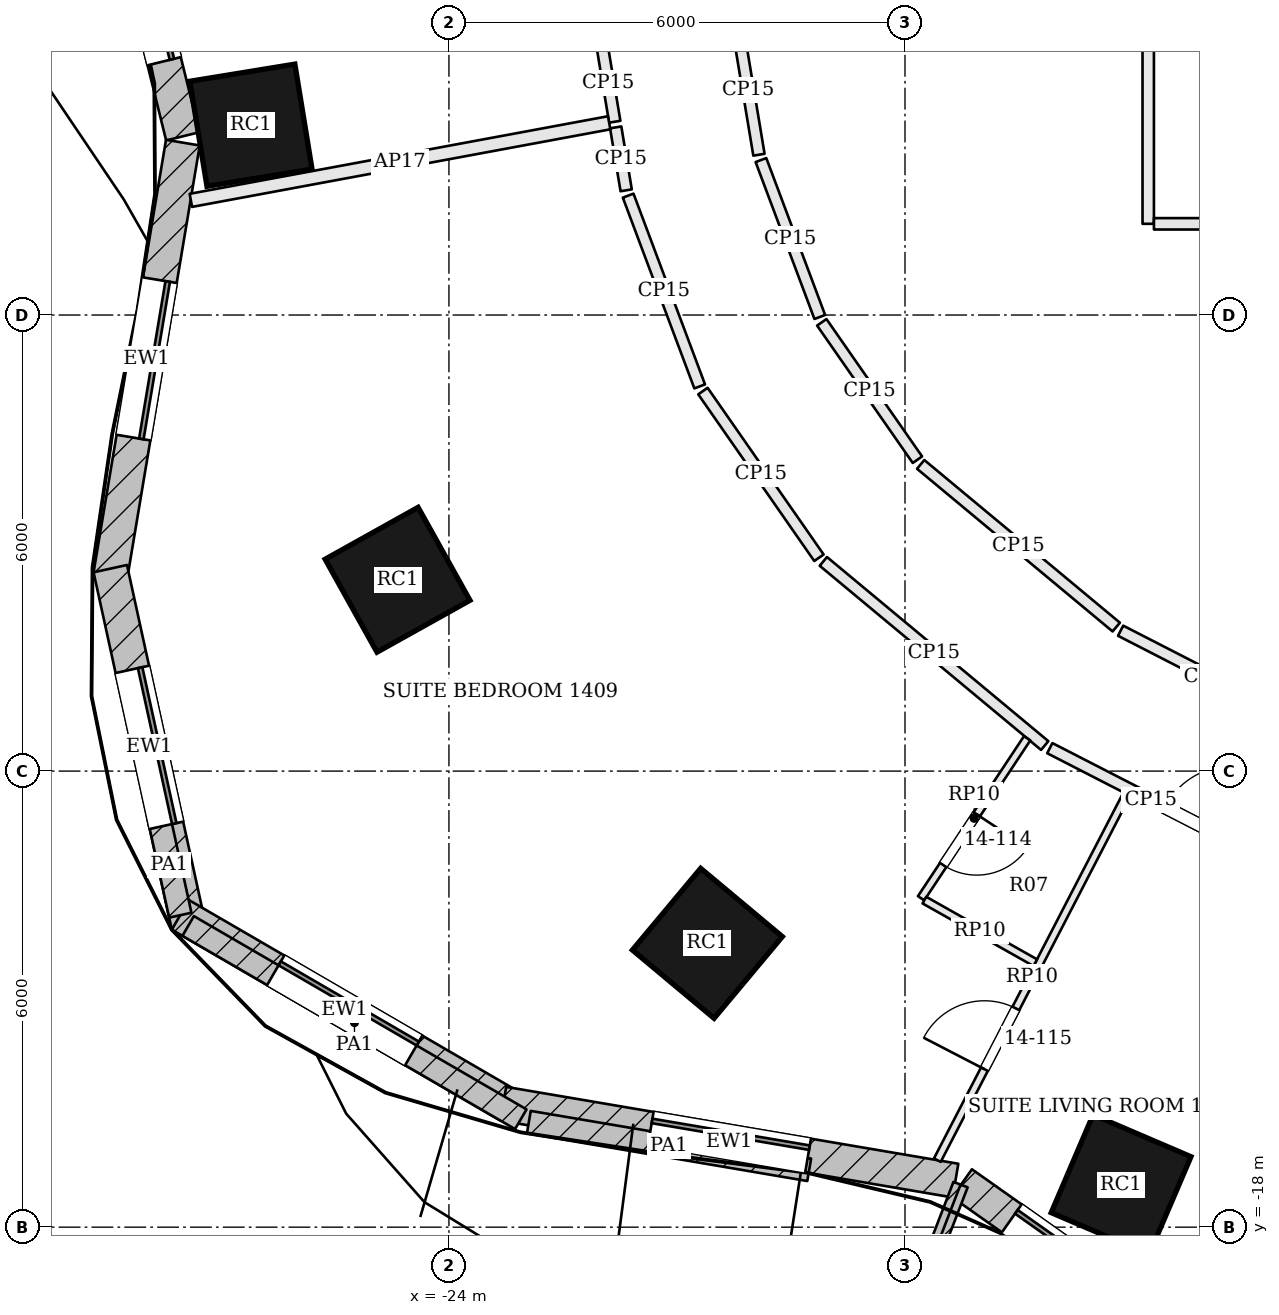
"""IFC4 building model, lengths in metres.
Left out: names, types, materials, properties, quantities, classifications, styles, units other than length and angle.
Written with IfcOpenShell. Run it as: python <this file> out.ifc"""

import sys

from ifc_helpers import new_model, si_unit, direction, frame, frame_2d, origin, origin_2d, place, context, subcontext, project, spatial, rectangle, extrude, element, fill, save


model = new_model("IFC4")
c1 = context("Model", 3, precision=1e-05, world=origin(), true_north=direction((0.0, 1.0)))
c2 = subcontext(c1, "Body", "Model", "MODEL_VIEW")
j1 = project(units=[si_unit("LENGTHUNIT", "METRE"), si_unit("PLANEANGLEUNIT", "RADIAN")], contexts=[c1])
p1 = place(None, origin())
s1 = spatial("IfcSite", under=j1, at=p1, CompositionType="ELEMENT")
p2 = place(p1, origin())
s2 = spatial("IfcBuilding", under=s1, at=p2, CompositionType="ELEMENT")
p3 = place(p2, frame((0.0, 0.0, 66.3)))
s3 = spatial("IfcBuildingStorey", under=s2, at=p3, CompositionType="ELEMENT", Elevation=66.3)
for number, where, z_axis, x_axis in (
    (1, (-26.605, -3.503, 0.0), (0.0, 0.0, 1.0), (0.161, -0.987, 0.0)),
    (2, (-24.676, -9.483, 0.0), (0.0, 0.0, 1.0), (0.487, -0.873, 0.0)),
    (3, (-20.6, -14.266, 0.0), (0.0, 0.0, 1.0), (0.767, -0.641, 0.0)),
    (4, (-15.157, -17.441, 0.0), (0.0, 0.0, 1.0), (0.919, -0.394, 0.0)),
):
    element("IfcColumn", number, at=place(p3, frame(where, z_axis=z_axis, x_axis=x_axis)), inside=s3, PredefinedType="COLUMN", context=c2, shape_type="SweptSolid", body=[
        extrude(rectangle(XDim=1.4, YDim=1.4, at=origin_2d()), origin(), (0.0, 0.0, 1.0), 3.6),
    ])
p4 = place(p3, frame((-28.422, 0.075, 0.0), z_axis=(0.0, 0.0, 1.0), x_axis=(0.239809222807, -0.970820033094, 0.0)))
e5 = element("IfcWall", 5, at=p4, inside=s3, PredefinedType="SOLIDWALL", context=c2, shape_type="SweptSolid", body=[
    extrude(rectangle(XDim=3.836, YDim=0.45, at=frame_2d((1.918, 0.0))), origin(), (0.0, 0.0, 1.0), 3.4),
])
p5 = place(p4, frame((1.018, 0.0, 0.9)))
e6 = element("IfcOpeningElement", 6, at=p5, cuts=e5, PredefinedType="OPENING", context=c2, shape_type="SweptSolid", body=[
    extrude(rectangle(XDim=1.8, YDim=2.0, at=frame_2d((0.9, 1.0))), frame((0.0, 0.235, 0.0), z_axis=(0.0, -1.0, 0.0), x_axis=(1.0, 0.0, 0.0)), (0.0, 0.0, 1.0), 0.47),
])
p6 = place(p3, frame((-27.5, -3.732, 0.0), z_axis=(0.0, 0.0, 1.0), x_axis=(-0.165174419367, -0.986264371853, 0.0)))
e7 = element("IfcWall", 7, at=p6, inside=s3, PredefinedType="SOLIDWALL", context=c2, shape_type="SweptSolid", body=[
    extrude(rectangle(XDim=5.769, YDim=0.45, at=frame_2d((2.885, 0.0))), origin(), (0.0, 0.0, 1.0), 3.4),
])
p7 = place(p6, frame((1.834, 0.0, 0.9)))
e8 = element("IfcOpeningElement", 8, at=p7, cuts=e7, PredefinedType="OPENING", context=c2, shape_type="SweptSolid", body=[
    extrude(rectangle(XDim=2.1, YDim=2.0, at=frame_2d((1.05, 1.0))), frame((0.0, 0.235, 0.0), z_axis=(0.0, -1.0, 0.0), x_axis=(1.0, 0.0, 0.0)), (0.0, 0.0, 1.0), 0.47),
])
p8 = place(p3, frame((-28.456, -9.337, 0.0), z_axis=(0.0, 0.0, 1.0), x_axis=(0.213878425795, -0.976860286315, 0.0)))
e9 = element("IfcWall", 9, at=p8, inside=s3, PredefinedType="SOLIDWALL", context=c2, shape_type="SweptSolid", body=[
    extrude(rectangle(XDim=4.812, YDim=0.45, at=frame_2d((2.406, 0.0))), origin(), (0.0, 0.0, 1.0), 3.4),
])
p9 = place(p8, frame((1.356, 0.0, 0.9)))
e10 = element("IfcOpeningElement", 10, at=p9, cuts=e9, PredefinedType="OPENING", context=c2, shape_type="SweptSolid", body=[
    extrude(rectangle(XDim=2.1, YDim=2.0, at=frame_2d((1.05, 1.0))), frame((0.0, 0.235, 0.0), z_axis=(0.0, -1.0, 0.0), x_axis=(1.0, 0.0, 0.0)), (0.0, 0.0, 1.0), 0.47),
])
p10 = place(p3, frame((-27.533, -13.891, 0.0), z_axis=(0.0, 0.0, 1.0), x_axis=(0.864657614938, -0.502361631625, 0.0)))
e11 = element("IfcWall", 11, at=p10, inside=s3, PredefinedType="SOLIDWALL", context=c2, shape_type="SweptSolid", body=[
    extrude(rectangle(XDim=5.001, YDim=0.45, at=frame_2d((2.5, 0.0))), origin(), (0.0, 0.0, 1.0), 3.4),
])
p11 = place(p10, frame((1.45, 0.0, 0.9)))
e12 = element("IfcOpeningElement", 12, at=p11, cuts=e11, PredefinedType="OPENING", context=c2, shape_type="SweptSolid", body=[
    extrude(rectangle(XDim=2.1, YDim=2.0, at=frame_2d((1.05, 1.0))), frame((0.0, 0.235, 0.0), z_axis=(0.0, -1.0, 0.0), x_axis=(1.0, 0.0, 0.0)), (0.0, 0.0, 1.0), 0.47),
])
p12 = place(p3, frame((-23.284, -16.376, 0.0), z_axis=(0.0, 0.0, 1.0), x_axis=(0.985861729428, -0.167560885797, 0.0)))
e13 = element("IfcWall", 13, at=p12, inside=s3, PredefinedType="SOLIDWALL", context=c2, shape_type="SweptSolid", body=[
    extrude(rectangle(XDim=6.033, YDim=0.45, at=frame_2d((3.017, 0.0))), origin(), (0.0, 0.0, 1.0), 3.4),
])
p13 = place(p12, frame((1.967, 0.0, 0.9)))
e14 = element("IfcOpeningElement", 14, at=p13, cuts=e13, PredefinedType="OPENING", context=c2, shape_type="SweptSolid", body=[
    extrude(rectangle(XDim=2.1, YDim=2.0, at=frame_2d((1.05, 1.0))), frame((0.0, 0.235, 0.0), z_axis=(0.0, -1.0, 0.0), x_axis=(1.0, 0.0, 0.0)), (0.0, 0.0, 1.0), 0.47),
])
p14 = place(p3, frame((-17.249, -17.422, 0.0), z_axis=(0.0, 0.0, 1.0), x_axis=(0.816589291225, -0.577219134694, 0.0)))
e15 = element("IfcWall", 15, at=p14, inside=s3, PredefinedType="SOLIDWALL", context=c2, shape_type="SweptSolid", body=[
    extrude(rectangle(XDim=3.701, YDim=0.45, at=frame_2d((1.851, 0.0))), origin(), (0.0, 0.0, 1.0), 3.4),
])
p15 = place(p14, frame((0.801, 0.0, 0.9)))
e16 = element("IfcOpeningElement", 16, at=p15, cuts=e15, PredefinedType="OPENING", context=c2, shape_type="SweptSolid", body=[
    extrude(rectangle(XDim=2.1, YDim=2.0, at=frame_2d((1.05, 1.0))), frame((0.0, 0.235, 0.0), z_axis=(0.0, -1.0, 0.0), x_axis=(1.0, 0.0, 0.0)), (0.0, 0.0, 1.0), 0.47),
])
p16 = place(p3, frame((-17.269, -17.44, 0.0), z_axis=(0.0, 0.0, 1.0), x_axis=(-0.359381039836, -0.933190906624, 0.0)))
e17 = element("IfcWall", 17, at=p16, inside=s3, PredefinedType="SOLIDWALL", context=c2, shape_type="SweptSolid", body=[
    extrude(rectangle(XDim=1.75, YDim=0.2, at=frame_2d((0.875, 0.0))), origin(), (0.0, 0.0, 1.0), 3.4),
])
p17 = place(p3, frame((-27.823, -12.577, 3.6), z_axis=(0.0, 0.0, 1.0), x_axis=(0.213826357694, -0.976871684898, 0.0)))
e18 = element("IfcWall", 18, at=p17, inside=s3, PredefinedType="PARAPET", context=c2, shape_type="SweptSolid", body=[
    extrude(rectangle(XDim=1.35, YDim=0.3, at=frame_2d((0.675, 0.0))), origin(), (0.0, 0.0, 1.0), 1.1),
])
p18 = place(p3, frame((-27.431, -14.038, 3.6), z_axis=(0.0, 0.0, 1.0), x_axis=(0.864664590165, -0.502349625773, 0.0)))
e19 = element("IfcWall", 19, at=p18, inside=s3, PredefinedType="PARAPET", context=c2, shape_type="SweptSolid", body=[
    extrude(rectangle(XDim=5.061, YDim=0.3, at=frame_2d((2.531, 0.0))), origin(), (0.0, 0.0, 1.0), 1.1),
])
p19 = place(p3, frame((-22.949, -16.618, 3.6), z_axis=(0.0, 0.0, 1.0), x_axis=(0.985859727788, -0.167572662229, 0.0)))
e20 = element("IfcWall", 20, at=p19, inside=s3, PredefinedType="PARAPET", context=c2, shape_type="SweptSolid", body=[
    extrude(rectangle(XDim=3.741, YDim=0.3, at=frame_2d((1.871, 0.0))), origin(), (0.0, 0.0, 1.0), 1.1),
])
p20 = place(p3, frame((-21.989, -2.43, 0.0), z_axis=(0.0, 0.0, 1.0), x_axis=(0.164170791844, -0.986431929281, 0.0)))
e21 = element("IfcWall", 21, at=p20, inside=s3, PredefinedType="PARTITIONING", context=c2, shape_type="SweptSolid", body=[
    extrude(rectangle(XDim=1.041, YDim=0.15, at=frame_2d((0.521, 0.0))), origin(), (0.0, 0.0, 1.0), 2.68),
])
p21 = place(p3, frame((-27.396, -4.491, 0.0), z_axis=(0.0, 0.0, 1.0), x_axis=(0.983238590395, 0.182323543069, 0.0)))
e22 = element("IfcWall", 22, at=p21, inside=s3, PredefinedType="PARTITIONING", context=c2, shape_type="SweptSolid", body=[
    extrude(rectangle(XDim=5.597, YDim=0.175, at=frame_2d((2.799, 0.0))), origin(), (0.0, 0.0, 1.0), 2.68),
])
p22 = place(p3, frame((-21.806, -3.531, 0.0), z_axis=(0.0, 0.0, 1.0), x_axis=(0.164068764938, -0.986448904086, 0.0)))
e23 = element("IfcWall", 23, at=p22, inside=s3, PredefinedType="PARTITIONING", context=c2, shape_type="SweptSolid", body=[
    extrude(rectangle(XDim=0.839, YDim=0.15, at=frame_2d((0.42, 0.0))), origin(), (0.0, 0.0, 1.0), 2.68),
])
p23 = place(p3, frame((-21.642, -4.429, 0.0), z_axis=(0.0, 0.0, 1.0), x_axis=(0.350963719781, -0.936389057709, 0.0)))
e24 = element("IfcWall", 24, at=p23, inside=s3, PredefinedType="PARTITIONING", context=c2, shape_type="SweptSolid", body=[
    extrude(rectangle(XDim=2.68, YDim=0.15, at=frame_2d((1.34, 0.0))), origin(), (0.0, 0.0, 1.0), 2.68),
])
p24 = place(p3, frame((-20.658, -7.0, 0.0), z_axis=(0.0, 0.0, 1.0), x_axis=(0.571227800085, -0.820791569407, 0.0)))
e25 = element("IfcWall", 25, at=p24, inside=s3, PredefinedType="PARTITIONING", context=c2, shape_type="SweptSolid", body=[
    extrude(rectangle(XDim=2.672, YDim=0.15, at=frame_2d((1.336, 0.0))), origin(), (0.0, 0.0, 1.0), 2.68),
])
p25 = place(p3, frame((-19.074, -9.241, 0.0), z_axis=(0.0, 0.0, 1.0), x_axis=(0.768812565259, -0.639474189863, 0.0)))
e26 = element("IfcWall", 26, at=p25, inside=s3, PredefinedType="PARTITIONING", context=c2, shape_type="SweptSolid", body=[
    extrude(rectangle(XDim=3.788, YDim=0.15, at=frame_2d((1.894, 0.0))), origin(), (0.0, 0.0, 1.0), 2.68),
])
p26 = place(p3, frame((-16.095, -11.698, 0.0), z_axis=(0.0, 0.0, 1.0), x_axis=(0.88955984693, -0.456818649717, 0.0)))
e27 = element("IfcWall", 27, at=p26, inside=s3, PredefinedType="PARTITIONING", context=c2, shape_type="SweptSolid", body=[
    extrude(rectangle(XDim=2.991, YDim=0.15, at=frame_2d((1.496, 0.0))), origin(), (0.0, 0.0, 1.0), 2.68),
])
p27 = place(p26, frame((1.7, 0.0, 0.0)))
e28 = element("IfcOpeningElement", 28, at=p27, cuts=e27, PredefinedType="OPENING", context=c2, shape_type="SweptSolid", body=[
    extrude(rectangle(XDim=1.0, YDim=2.1, at=frame_2d((0.5, 1.05))), frame((0.0, 0.085, 0.0), z_axis=(0.0, -1.0, 0.0), x_axis=(1.0, 0.0, 0.0)), (0.0, 0.0, 1.0), 0.17),
])
p28 = place(p3, frame((-19.921, -3.891, 0.0), z_axis=(0.0, 0.0, 1.0), x_axis=(-0.164100753818, 0.986443583078, 0.0)))
e29 = element("IfcWall", 29, at=p28, inside=s3, PredefinedType="PARTITIONING", context=c2, shape_type="SweptSolid", body=[
    extrude(rectangle(XDim=1.726, YDim=0.15, at=frame_2d((0.863, 0.0))), origin(), (0.0, 0.0, 1.0), 2.68),
])
p29 = place(p3, frame((-14.8, 10.208, 0.0), z_axis=(0.0, 0.0, 1.0), x_axis=(0.0, -1.0, 0.0)))
e30 = element("IfcWall", 30, at=p29, inside=s3, PredefinedType="PARTITIONING", context=c2, shape_type="SweptSolid", body=[
    extrude(rectangle(XDim=15.008, YDim=0.15, at=frame_2d((7.504, 0.0))), origin(), (0.0, 0.0, 1.0), 2.68),
])
p30 = place(p29, frame((4.567, 0.0, 0.0)))
e31 = element("IfcOpeningElement", 31, at=p30, cuts=e30, PredefinedType="OPENING", context=c2, shape_type="SweptSolid", body=[
    extrude(rectangle(XDim=1.0, YDim=2.1, at=frame_2d((0.5, 1.05))), frame((0.0, 0.085, 0.0), z_axis=(0.0, -1.0, 0.0), x_axis=(1.0, 0.0, 0.0)), (0.0, 0.0, 1.0), 0.17),
])
p31 = place(p3, frame((-14.725, -4.8, 0.0), z_axis=(0.0, 0.0, 1.0), x_axis=(1.0, 0.0, 0.0)))
e32 = element("IfcWall", 32, at=p31, inside=s3, PredefinedType="PARTITIONING", context=c2, shape_type="SweptSolid", body=[
    extrude(rectangle(XDim=29.525, YDim=0.15, at=frame_2d((14.763, 0.0))), origin(), (0.0, 0.0, 1.0), 2.68),
])
p32 = place(p31, frame((3.425, 0.0, 0.0)))
e33 = element("IfcOpeningElement", 33, at=p32, cuts=e32, PredefinedType="OPENING", context=c2, shape_type="SweptSolid", body=[
    extrude(rectangle(XDim=1.8, YDim=2.1, at=frame_2d((0.9, 1.05))), frame((0.0, 0.085, 0.0), z_axis=(0.0, -1.0, 0.0), x_axis=(1.0, 0.0, 0.0)), (0.0, 0.0, 1.0), 0.17),
])
p33 = place(p31, frame((13.825, 0.0, 0.0)))
e34 = element("IfcOpeningElement", 34, at=p33, cuts=e32, PredefinedType="OPENING", context=c2, shape_type="SweptSolid", body=[
    extrude(rectangle(XDim=1.8, YDim=2.1, at=frame_2d((0.9, 1.05))), frame((0.0, 0.085, 0.0), z_axis=(0.0, -1.0, 0.0), x_axis=(1.0, 0.0, 0.0)), (0.0, 0.0, 1.0), 0.17),
])
p34 = place(p31, frame((24.225, 0.0, 0.0)))
e35 = element("IfcOpeningElement", 35, at=p34, cuts=e32, PredefinedType="OPENING", context=c2, shape_type="SweptSolid", body=[
    extrude(rectangle(XDim=1.8, YDim=2.1, at=frame_2d((0.9, 1.05))), frame((0.0, 0.085, 0.0), z_axis=(0.0, -1.0, 0.0), x_axis=(1.0, 0.0, 0.0)), (0.0, 0.0, 1.0), 0.17),
])
p35 = place(p3, frame((-12.815, -11.359, 0.0), z_axis=(0.0, 0.0, 1.0), x_axis=(-0.889622877315, 0.456695890236, 0.0)))
e36 = element("IfcWall", 36, at=p35, inside=s3, PredefinedType="PARTITIONING", context=c2, shape_type="SweptSolid", body=[
    extrude(rectangle(XDim=2.64, YDim=0.15, at=frame_2d((1.32, 0.0))), origin(), (0.0, 0.0, 1.0), 2.68),
])
p36 = place(p3, frame((-15.221, -10.105, 0.0), z_axis=(0.0, 0.0, 1.0), x_axis=(-0.768812916989, 0.639473766992, 0.0)))
e37 = element("IfcWall", 37, at=p36, inside=s3, PredefinedType="PARTITIONING", context=c2, shape_type="SweptSolid", body=[
    extrude(rectangle(XDim=3.347, YDim=0.15, at=frame_2d((1.673, 0.0))), origin(), (0.0, 0.0, 1.0), 2.68),
])
p37 = place(p3, frame((-17.836, -7.904, 0.0), z_axis=(0.0, 0.0, 1.0), x_axis=(-0.571317790711, 0.820728933338, 0.0)))
e38 = element("IfcWall", 38, at=p37, inside=s3, PredefinedType="PARTITIONING", context=c2, shape_type="SweptSolid", body=[
    extrude(rectangle(XDim=2.202, YDim=0.15, at=frame_2d((1.101, 0.0))), origin(), (0.0, 0.0, 1.0), 2.68),
])
p38 = place(p3, frame((-19.121, -6.026, 0.0), z_axis=(0.0, 0.0, 1.0), x_axis=(-0.351026357955, 0.936365578191, 0.0)))
e39 = element("IfcWall", 39, at=p38, inside=s3, PredefinedType="PARTITIONING", context=c2, shape_type="SweptSolid", body=[
    extrude(rectangle(XDim=2.205, YDim=0.15, at=frame_2d((1.103, 0.0))), origin(), (0.0, 0.0, 1.0), 2.68),
])
p39 = place(p3, frame((-17.575, -17.118, 0.0), z_axis=(0.0, 0.0, 1.0), x_axis=(0.459775633783, 0.888035115623, 0.0)))
e40 = element("IfcWall", 40, at=p39, inside=s3, PredefinedType="PARTITIONING", context=c2, shape_type="SweptSolid", body=[
    extrude(rectangle(XDim=5.423, YDim=0.1, at=frame_2d((2.711, 0.0))), origin(), (0.0, 0.0, 1.0), 2.68),
])
p40 = place(p39, frame((1.348, 0.0, 0.0)))
e41 = element("IfcOpeningElement", 41, at=p40, cuts=e40, PredefinedType="OPENING", context=c2, shape_type="SweptSolid", body=[
    extrude(rectangle(XDim=0.9, YDim=2.4, at=frame_2d((0.45, 1.2))), frame((0.0, 0.06, 0.0), z_axis=(0.0, -1.0, 0.0), x_axis=(1.0, 0.0, 0.0)), (0.0, 0.0, 1.0), 0.12),
])
p41 = place(p3, frame((-16.393, -11.568, 0.0), z_axis=(0.0, 0.0, 1.0), x_axis=(-0.552534144139, -0.833490263627, 0.0)))
e42 = element("IfcWall", 42, at=p41, inside=s3, PredefinedType="PARTITIONING", context=c2, shape_type="SweptSolid", body=[
    extrude(rectangle(XDim=2.525, YDim=0.1, at=frame_2d((1.263, 0.0))), origin(), (0.0, 0.0, 1.0), 2.68),
])
p42 = place(p41, frame((1.2, 0.0, 0.0)))
e43 = element("IfcOpeningElement", 43, at=p42, cuts=e42, PredefinedType="OPENING", context=c2, shape_type="SweptSolid", body=[
    extrude(rectangle(XDim=0.8, YDim=2.1, at=frame_2d((0.4, 1.05))), frame((0.0, 0.06, 0.0), z_axis=(0.0, -1.0, 0.0), x_axis=(1.0, 0.0, 0.0)), (0.0, 0.0, 1.0), 0.12),
])
p43 = place(p3, frame((-17.745, -13.698, 0.0), z_axis=(0.0, 0.0, 1.0), x_axis=(0.870948077087, -0.491375057383, 0.0)))
e44 = element("IfcWall", 44, at=p43, inside=s3, PredefinedType="PARTITIONING", context=c2, shape_type="SweptSolid", body=[
    extrude(rectangle(XDim=1.675, YDim=0.1, at=frame_2d((0.837, 0.0))), origin(), (0.0, 0.0, 1.0), 2.68),
])
p44 = place(p5, origin())
e45 = element("IfcWindow", 45, at=p44, inside=s3, PartitioningType="SINGLE_PANEL", PredefinedType="WINDOW", context=c2, shape_type="SweptSolid", body=[
    extrude(rectangle(XDim=1.8, YDim=2.0, at=frame_2d((0.9, 1.0))), frame((0.0, 0.135, 0.0), z_axis=(0.0, -1.0, 0.0), x_axis=(1.0, 0.0, 0.0)), (0.0, 0.0, 1.0), 0.06),
])
fill(e6, e45)
p45 = place(p7, origin())
e46 = element("IfcWindow", 46, at=p45, inside=s3, PartitioningType="SINGLE_PANEL", PredefinedType="WINDOW", context=c2, shape_type="SweptSolid", body=[
    extrude(rectangle(XDim=2.1, YDim=2.0, at=frame_2d((1.05, 1.0))), frame((0.0, 0.135, 0.0), z_axis=(0.0, -1.0, 0.0), x_axis=(1.0, 0.0, 0.0)), (0.0, 0.0, 1.0), 0.06),
])
fill(e8, e46)
p46 = place(p9, origin())
e47 = element("IfcWindow", 47, at=p46, inside=s3, PartitioningType="SINGLE_PANEL", PredefinedType="WINDOW", context=c2, shape_type="SweptSolid", body=[
    extrude(rectangle(XDim=2.1, YDim=2.0, at=frame_2d((1.05, 1.0))), frame((0.0, 0.135, 0.0), z_axis=(0.0, -1.0, 0.0), x_axis=(1.0, 0.0, 0.0)), (0.0, 0.0, 1.0), 0.06),
])
fill(e10, e47)
p47 = place(p11, origin())
e48 = element("IfcWindow", 48, at=p47, inside=s3, PartitioningType="SINGLE_PANEL", PredefinedType="WINDOW", context=c2, shape_type="SweptSolid", body=[
    extrude(rectangle(XDim=2.1, YDim=2.0, at=frame_2d((1.05, 1.0))), frame((0.0, 0.135, 0.0), z_axis=(0.0, -1.0, 0.0), x_axis=(1.0, 0.0, 0.0)), (0.0, 0.0, 1.0), 0.06),
])
fill(e12, e48)
p48 = place(p13, origin())
e49 = element("IfcWindow", 49, at=p48, inside=s3, PartitioningType="SINGLE_PANEL", PredefinedType="WINDOW", context=c2, shape_type="SweptSolid", body=[
    extrude(rectangle(XDim=2.1, YDim=2.0, at=frame_2d((1.05, 1.0))), frame((0.0, 0.135, 0.0), z_axis=(0.0, -1.0, 0.0), x_axis=(1.0, 0.0, 0.0)), (0.0, 0.0, 1.0), 0.06),
])
fill(e14, e49)
p49 = place(p15, origin())
e50 = element("IfcWindow", 50, at=p49, inside=s3, PartitioningType="SINGLE_PANEL", PredefinedType="WINDOW", context=c2, shape_type="SweptSolid", body=[
    extrude(rectangle(XDim=2.1, YDim=2.0, at=frame_2d((1.05, 1.0))), frame((0.0, 0.135, 0.0), z_axis=(0.0, -1.0, 0.0), x_axis=(1.0, 0.0, 0.0)), (0.0, 0.0, 1.0), 0.06),
])
fill(e16, e50)
p50 = place(p42, origin())
e51 = element("IfcDoor", 51, at=p50, inside=s3, OperationType="SINGLE_SWING_LEFT", PredefinedType="DOOR", context=c2, shape_type="SweptSolid", body=[
    extrude(rectangle(XDim=0.8, YDim=2.1, at=frame_2d((0.4, 1.05))), frame((0.0, 0.025, 0.0), z_axis=(0.0, -1.0, 0.0), x_axis=(1.0, 0.0, 0.0)), (0.0, 0.0, 1.0), 0.05),
])
fill(e43, e51)
p51 = place(p40, origin())
e52 = element("IfcDoor", 52, at=p51, inside=s3, OperationType="SINGLE_SWING_LEFT", PredefinedType="DOOR", context=c2, shape_type="SweptSolid", body=[
    extrude(rectangle(XDim=0.9, YDim=2.4, at=frame_2d((0.45, 1.2))), frame((0.0, 0.025, 0.0), z_axis=(0.0, -1.0, 0.0), x_axis=(1.0, 0.0, 0.0)), (0.0, 0.0, 1.0), 0.05),
])
fill(e41, e52)
p52 = place(p27, origin())
e53 = element("IfcDoor", 53, at=p52, inside=s3, OperationType="SINGLE_SWING_RIGHT", PredefinedType="DOOR", context=c2, shape_type="SweptSolid", body=[
    extrude(rectangle(XDim=1.0, YDim=2.1, at=frame_2d((0.5, 1.05))), frame((0.0, 0.025, 0.0), z_axis=(0.0, -1.0, 0.0), x_axis=(1.0, 0.0, 0.0)), (0.0, 0.0, 1.0), 0.05),
])
fill(e28, e53)
save(model, sys.argv[1])
